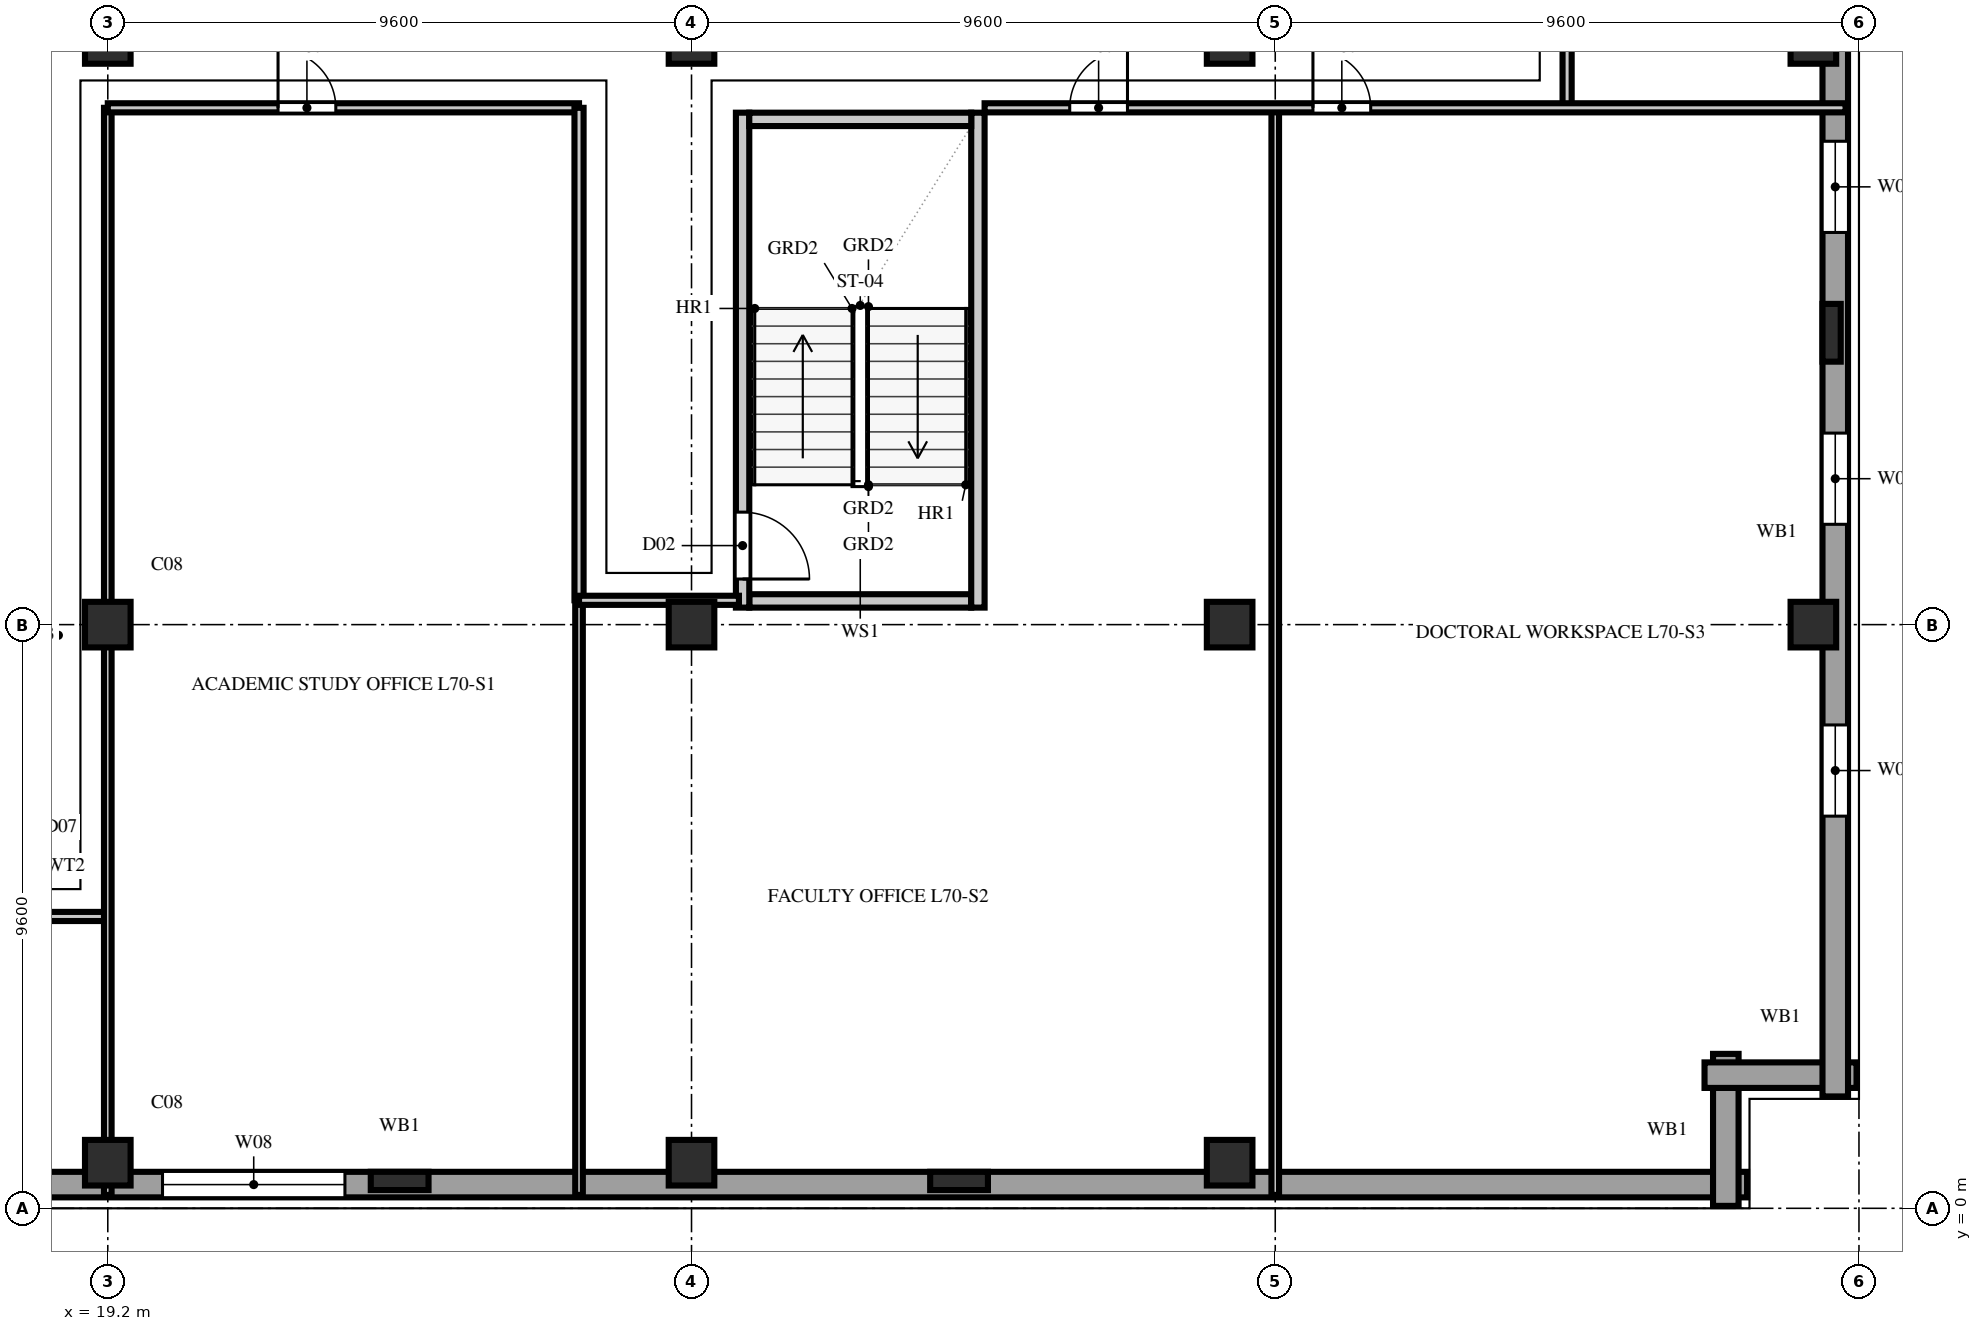
"""IFC4 building model, lengths in metres.
Left out: names, types, materials, properties, quantities, classifications, styles, units other than length and angle.
Written with IfcOpenShell. Run it as: python <this file> out.ifc"""

import sys

from ifc_helpers import new_model, si_unit, direction, frame, frame_2d, origin, origin_2d, place, context, subcontext, project, spatial, rectangle, extrude, element, fill, save


model = new_model("IFC4")
c1 = context("Model", 3, precision=1e-05, world=origin(), true_north=direction((0.0, 1.0)))
c2 = subcontext(c1, "Body", "Model", "MODEL_VIEW")
j1 = project(units=[si_unit("LENGTHUNIT", "METRE"), si_unit("PLANEANGLEUNIT", "RADIAN")], contexts=[c1])
p1 = place(None, origin())
s1 = spatial("IfcSite", under=j1, at=p1, CompositionType="ELEMENT")
p2 = place(p1, origin())
s2 = spatial("IfcBuilding", under=s1, at=p2, CompositionType="ELEMENT")
p3 = place(p2, frame((0.0, 0.0, 277.2)))
s3 = spatial("IfcBuildingStorey", under=s2, at=p3, CompositionType="ELEMENT", Elevation=277.2)
for number, where, z_axis, x_axis in (
    (1, (19.2, 0.75, 0.0), (0.0, 0.0, 1.0), (1.0, 0.0, 0.0)),
    (2, (19.2, 9.6, 0.0), (0.0, 0.0, 1.0), (1.0, 0.0, 0.0)),
    (3, (19.2, 19.2, 0.0), (0.0, 0.0, 1.0), (1.0, 0.0, 0.0)),
    (4, (28.8, 0.75, 0.0), (0.0, 0.0, 1.0), (1.0, 0.0, 0.0)),
    (5, (28.8, 9.6, 0.0), (0.0, 0.0, 1.0), (1.0, 0.0, 0.0)),
    (6, (28.8, 19.2, 0.0), (0.0, 0.0, 1.0), (1.0, 0.0, 0.0)),
    (7, (37.65, 0.75, 0.0), (0.0, 0.0, 1.0), (1.0, 0.0, 0.0)),
    (8, (37.65, 9.6, 0.0), (0.0, 0.0, 1.0), (1.0, 0.0, 0.0)),
    (9, (37.65, 19.2, 0.0), (0.0, 0.0, 1.0), (1.0, 0.0, 0.0)),
    (10, (47.25, 9.6, 0.0), (0.0, 0.0, 1.0), (1.0, 0.0, 0.0)),
    (11, (47.25, 19.2, 0.0), (0.0, 0.0, 1.0), (1.0, 0.0, 0.0)),
):
    element("IfcColumn", number, at=place(p3, frame(where, z_axis=z_axis, x_axis=x_axis)), inside=s3, PredefinedType="COLUMN", context=c2, shape_type="SweptSolid", body=[
        extrude(rectangle(XDim=0.75, YDim=0.75, at=origin_2d()), origin(), (0.0, 0.0, 1.0), 3.8),
    ])
for number, where, z_axis, x_axis in (
    (12, (24.0, 0.45, 0.0), (0.0, 0.0, 1.0), (1.0, 0.0, 0.0)),
    (13, (33.2, 0.45, 0.0), (0.0, 0.0, 1.0), (1.0, 0.0, 0.0)),
    (14, (47.55, 14.4, 0.0), (0.0, 0.0, 1.0), (0.0, 1.0, 0.0)),
):
    element("IfcColumn", number, at=place(p3, frame(where, z_axis=z_axis, x_axis=x_axis)), inside=s3, PredefinedType="PILASTER", context=c2, shape_type="SweptSolid", body=[
        extrude(rectangle(XDim=0.95, YDim=0.3, at=origin_2d()), origin(), (0.0, 0.0, 1.0), 3.8),
    ])
p4 = place(p3, frame((1.84, 0.39, 0.0), z_axis=(0.0, 0.0, 1.0), x_axis=(1.0, 0.0, 0.0)))
e15 = element("IfcWall", 15, at=p4, inside=s3, PredefinedType="SOLIDWALL", context=c2, shape_type="SweptSolid", body=[
    extrude(rectangle(XDim=44.32, YDim=0.42, at=frame_2d((22.16, 0.0))), origin(), (0.0, 0.0, 1.0), 3.54),
])
p5 = place(p4, frame((3.86, 0.0, 0.75)))
e16 = element("IfcOpeningElement", 16, at=p5, cuts=e15, PredefinedType="OPENING", context=c2, shape_type="SweptSolid", body=[
    extrude(rectangle(XDim=3.0, YDim=1.9, at=frame_2d((1.5, 0.95))), frame((0.0, 0.222, 0.0), z_axis=(0.0, -1.0, 0.0), x_axis=(1.0, 0.0, 0.0)), (0.0, 0.0, 1.0), 0.444),
])
p6 = place(p4, frame((8.66, 0.0, 0.75)))
e17 = element("IfcOpeningElement", 17, at=p6, cuts=e15, PredefinedType="OPENING", context=c2, shape_type="SweptSolid", body=[
    extrude(rectangle(XDim=3.0, YDim=1.9, at=frame_2d((1.5, 0.95))), frame((0.0, 0.222, 0.0), z_axis=(0.0, -1.0, 0.0), x_axis=(1.0, 0.0, 0.0)), (0.0, 0.0, 1.0), 0.444),
])
p7 = place(p4, frame((18.26, 0.0, 0.75)))
e18 = element("IfcOpeningElement", 18, at=p7, cuts=e15, PredefinedType="OPENING", context=c2, shape_type="SweptSolid", body=[
    extrude(rectangle(XDim=3.0, YDim=1.9, at=frame_2d((1.5, 0.95))), frame((0.0, 0.222, 0.0), z_axis=(0.0, -1.0, 0.0), x_axis=(1.0, 0.0, 0.0)), (0.0, 0.0, 1.0), 0.444),
])
for number, where, z_axis, x_axis in (
    (19, (45.81, 0.04, 0.0), (0.0, 0.0, 1.0), (0.0, 1.0, 0.0)),
    (20, (45.46, 2.19, 0.0), (0.0, 0.0, 1.0), (1.0, 0.0, 0.0)),
):
    element("IfcWall", number, at=place(p3, frame(where, z_axis=z_axis, x_axis=x_axis)), inside=s3, PredefinedType="SOLIDWALL", context=c2, shape_type="SweptSolid", body=[
        extrude(rectangle(XDim=2.5, YDim=0.42, at=frame_2d((1.25, 0.0))), origin(), (0.0, 0.0, 1.0), 3.54),
    ])
p8 = place(p3, frame((47.61, 1.84, 0.0), z_axis=(0.0, 0.0, 1.0), x_axis=(0.0, 1.0, 0.0)))
e21 = element("IfcWall", 21, at=p8, inside=s3, PredefinedType="SOLIDWALL", context=c2, shape_type="SweptSolid", body=[
    extrude(rectangle(XDim=18.56, YDim=0.42, at=frame_2d((9.28, 0.0))), origin(), (0.0, 0.0, 1.0), 3.54),
])
p9 = place(p8, frame((4.61, 0.0, 0.85)))
e22 = element("IfcOpeningElement", 22, at=p9, cuts=e21, PredefinedType="OPENING", context=c2, shape_type="SweptSolid", body=[
    extrude(rectangle(XDim=1.5, YDim=1.85, at=frame_2d((0.75, 0.925))), frame((0.0, 0.222, 0.0), z_axis=(0.0, -1.0, 0.0), x_axis=(1.0, 0.0, 0.0)), (0.0, 0.0, 1.0), 0.444),
])
p10 = place(p8, frame((9.41, 0.0, 0.85)))
e23 = element("IfcOpeningElement", 23, at=p10, cuts=e21, PredefinedType="OPENING", context=c2, shape_type="SweptSolid", body=[
    extrude(rectangle(XDim=1.5, YDim=1.85, at=frame_2d((0.75, 0.925))), frame((0.0, 0.222, 0.0), z_axis=(0.0, -1.0, 0.0), x_axis=(1.0, 0.0, 0.0)), (0.0, 0.0, 1.0), 0.444),
])
p11 = place(p8, frame((14.21, 0.0, 0.85)))
e24 = element("IfcOpeningElement", 24, at=p11, cuts=e21, PredefinedType="OPENING", context=c2, shape_type="SweptSolid", body=[
    extrude(rectangle(XDim=1.5, YDim=1.85, at=frame_2d((0.75, 0.925))), frame((0.0, 0.222, 0.0), z_axis=(0.0, -1.0, 0.0), x_axis=(1.0, 0.0, 0.0)), (0.0, 0.0, 1.0), 0.444),
])
p12 = place(p3, frame((29.75, 9.99, 0.0), z_axis=(0.0, 0.0, 1.0), x_axis=(1.0, 0.0, 0.0)))
e25 = element("IfcWall", 25, at=p12, inside=s3, PredefinedType="SOLIDWALL", context=c2, shape_type="SweptSolid", body=[
    extrude(rectangle(XDim=3.65, YDim=0.22, at=frame_2d((1.825, 0.0))), origin(), (0.0, 0.0, 1.0), 3.54),
])
p13 = place(p3, frame((29.64, 9.88, 0.0), z_axis=(0.0, 0.0, 1.0), x_axis=(0.0, 1.0, 0.0)))
e26 = element("IfcWall", 26, at=p13, inside=s3, PredefinedType="SOLIDWALL", context=c2, shape_type="SweptSolid", body=[
    extrude(rectangle(XDim=8.14, YDim=0.22, at=frame_2d((4.07, 0.0))), origin(), (0.0, 0.0, 1.0), 3.54),
])
p14 = place(p13, frame((0.47, 0.0, 0.0)))
e27 = element("IfcOpeningElement", 27, at=p14, cuts=e26, PredefinedType="OPENING", context=c2, shape_type="SweptSolid", body=[
    extrude(rectangle(XDim=1.1, YDim=2.2, at=frame_2d((0.55, 1.1))), frame((0.0, 0.122, 0.0), z_axis=(0.0, -1.0, 0.0), x_axis=(1.0, 0.0, 0.0)), (0.0, 0.0, 1.0), 0.244),
])
p15 = place(p3, frame((33.51, 9.88, 0.0), z_axis=(0.0, 0.0, 1.0), x_axis=(0.0, 1.0, 0.0)))
e28 = element("IfcWall", 28, at=p15, inside=s3, PredefinedType="SOLIDWALL", context=c2, shape_type="SweptSolid", body=[
    extrude(rectangle(XDim=8.14, YDim=0.22, at=frame_2d((4.07, 0.0))), origin(), (0.0, 0.0, 1.0), 3.54),
])
p16 = place(p3, frame((29.75, 17.91, 0.0), z_axis=(0.0, 0.0, 1.0), x_axis=(1.0, 0.0, 0.0)))
e29 = element("IfcWall", 29, at=p16, inside=s3, PredefinedType="SOLIDWALL", context=c2, shape_type="SweptSolid", body=[
    extrude(rectangle(XDim=3.65, YDim=0.22, at=frame_2d((1.825, 0.0))), origin(), (0.0, 0.0, 1.0), 3.54),
])
p17 = place(p3, frame((17.05, 4.8, 0.0), z_axis=(0.0, 0.0, 1.0), x_axis=(1.0, 0.0, 0.0)))
e30 = element("IfcWall", 30, at=p17, inside=s3, PredefinedType="PARTITIONING", context=c2, shape_type="SweptSolid", body=[
    extrude(rectangle(XDim=2.15, YDim=0.15, at=frame_2d((1.075, 0.0))), origin(), (0.0, 0.0, 1.0), 3.54),
])
p18 = place(p3, frame((43.2, 18.1, 0.0), z_axis=(0.0, 0.0, 1.0), x_axis=(0.0, 1.0, 0.0)))
e31 = element("IfcWall", 31, at=p18, inside=s3, PredefinedType="PARTITIONING", context=c2, shape_type="SweptSolid", body=[
    extrude(rectangle(XDim=2.85, YDim=0.15, at=frame_2d((1.425, 0.0))), origin(), (0.0, 0.0, 1.0), 3.54),
])
p19 = place(p3, frame((19.2, 0.22, 0.0), z_axis=(0.0, 0.0, 1.0), x_axis=(0.0, 1.0, 0.0)))
e32 = element("IfcWall", 32, at=p19, inside=s3, PredefinedType="PARTITIONING", context=c2, shape_type="SweptSolid", body=[
    extrude(rectangle(XDim=0.53, YDim=0.125, at=frame_2d((0.265, 0.0))), origin(), (0.0, 0.0, 1.0), 3.54),
])
p20 = place(p3, frame((19.2, 0.75, 0.0), z_axis=(0.0, 0.0, 1.0), x_axis=(0.0, 1.0, 0.0)))
e33 = element("IfcWall", 33, at=p20, inside=s3, PredefinedType="PARTITIONING", context=c2, shape_type="SweptSolid", body=[
    extrude(rectangle(XDim=17.35, YDim=0.125, at=frame_2d((8.675, 0.0))), origin(), (0.0, 0.0, 1.0), 2.845),
])
p21 = place(p3, frame((19.2, 18.1, 0.0), z_axis=(0.0, 0.0, 1.0), x_axis=(1.0, 0.0, 0.0)))
e34 = element("IfcWall", 34, at=p21, inside=s3, PredefinedType="PARTITIONING", context=c2, shape_type="SweptSolid", body=[
    extrude(rectangle(XDim=7.75, YDim=0.15, at=frame_2d((3.875, 0.0))), origin(), (0.0, 0.0, 1.0), 3.54),
])
p22 = place(p21, frame((2.8, 0.0, 0.0)))
e35 = element("IfcOpeningElement", 35, at=p22, cuts=e34, PredefinedType="OPENING", context=c2, shape_type="SweptSolid", body=[
    extrude(rectangle(XDim=0.95, YDim=2.15, at=frame_2d((0.475, 1.075))), frame((0.0, 0.087, 0.0), z_axis=(0.0, -1.0, 0.0), x_axis=(1.0, 0.0, 0.0)), (0.0, 0.0, 1.0), 0.174),
])
p23 = place(p3, frame((26.95, 0.22, 0.0), z_axis=(0.0, 0.0, 1.0), x_axis=(0.0, 1.0, 0.0)))
e36 = element("IfcWall", 36, at=p23, inside=s3, PredefinedType="PARTITIONING", context=c2, shape_type="SweptSolid", body=[
    extrude(rectangle(XDim=9.78, YDim=0.125, at=frame_2d((4.89, 0.0))), origin(), (0.0, 0.0, 1.0), 3.54),
])
p24 = place(p3, frame((26.95, 10.0, 0.0), z_axis=(0.0, 0.0, 1.0), x_axis=(0.0, 1.0, 0.0)))
e37 = element("IfcWall", 37, at=p24, inside=s3, PredefinedType="PARTITIONING", context=c2, shape_type="SweptSolid", body=[
    extrude(rectangle(XDim=8.1, YDim=0.15, at=frame_2d((4.05, 0.0))), origin(), (0.0, 0.0, 1.0), 3.54),
])
p25 = place(p3, frame((26.95, 10.0, 0.0), z_axis=(0.0, 0.0, 1.0), x_axis=(1.0, 0.0, 0.0)))
e38 = element("IfcWall", 38, at=p25, inside=s3, PredefinedType="PARTITIONING", context=c2, shape_type="SweptSolid", body=[
    extrude(rectangle(XDim=2.63, YDim=0.15, at=frame_2d((1.315, 0.0))), origin(), (0.0, 0.0, 1.0), 3.54),
])
p26 = place(p3, frame((38.4, 0.22, 0.0), z_axis=(0.0, 0.0, 1.0), x_axis=(0.0, 1.0, 0.0)))
e39 = element("IfcWall", 39, at=p26, inside=s3, PredefinedType="PARTITIONING", context=c2, shape_type="SweptSolid", body=[
    extrude(rectangle(XDim=17.88, YDim=0.125, at=frame_2d((8.94, 0.0))), origin(), (0.0, 0.0, 1.0), 3.54),
])
p27 = place(p3, frame((33.62, 18.1, 0.0), z_axis=(0.0, 0.0, 1.0), x_axis=(1.0, 0.0, 0.0)))
e40 = element("IfcWall", 40, at=p27, inside=s3, PredefinedType="PARTITIONING", context=c2, shape_type="SweptSolid", body=[
    extrude(rectangle(XDim=14.16, YDim=0.15, at=frame_2d((7.08, 0.0))), origin(), (0.0, 0.0, 1.0), 3.54),
])
p28 = place(p27, frame((1.4, 0.0, 0.0)))
e41 = element("IfcOpeningElement", 41, at=p28, cuts=e40, PredefinedType="OPENING", context=c2, shape_type="SweptSolid", body=[
    extrude(rectangle(XDim=0.95, YDim=2.15, at=frame_2d((0.475, 1.075))), frame((0.0, 0.087, 0.0), z_axis=(0.0, -1.0, 0.0), x_axis=(1.0, 0.0, 0.0)), (0.0, 0.0, 1.0), 0.174),
])
p29 = place(p27, frame((5.4, 0.0, 0.0)))
e42 = element("IfcOpeningElement", 42, at=p29, cuts=e40, PredefinedType="OPENING", context=c2, shape_type="SweptSolid", body=[
    extrude(rectangle(XDim=0.95, YDim=2.15, at=frame_2d((0.475, 1.075))), frame((0.0, 0.087, 0.0), z_axis=(0.0, -1.0, 0.0), x_axis=(1.0, 0.0, 0.0)), (0.0, 0.0, 1.0), 0.174),
])
p30 = place(p7, origin())
e43 = element("IfcWindow", 43, at=p30, inside=s3, PartitioningType="TRIPLE_PANEL_VERTICAL", PredefinedType="WINDOW", context=c2, shape_type="SweptSolid", body=[
    extrude(rectangle(XDim=3.0, YDim=1.9, at=frame_2d((1.5, 0.95))), frame((0.0, 0.11, 0.0), z_axis=(0.0, -1.0, 0.0), x_axis=(1.0, 0.0, 0.0)), (0.0, 0.0, 1.0), 0.06),
])
fill(e18, e43)
p31 = place(p9, origin())
e44 = element("IfcWindow", 44, at=p31, inside=s3, PartitioningType="DOUBLE_PANEL_VERTICAL", PredefinedType="WINDOW", context=c2, shape_type="SweptSolid", body=[
    extrude(rectangle(XDim=1.5, YDim=1.85, at=frame_2d((0.75, 0.925))), frame((0.0, 0.11, 0.0), z_axis=(0.0, -1.0, 0.0), x_axis=(1.0, 0.0, 0.0)), (0.0, 0.0, 1.0), 0.06),
])
fill(e22, e44)
p32 = place(p10, origin())
e45 = element("IfcWindow", 45, at=p32, inside=s3, PartitioningType="DOUBLE_PANEL_VERTICAL", PredefinedType="WINDOW", context=c2, shape_type="SweptSolid", body=[
    extrude(rectangle(XDim=1.5, YDim=1.85, at=frame_2d((0.75, 0.925))), frame((0.0, 0.11, 0.0), z_axis=(0.0, -1.0, 0.0), x_axis=(1.0, 0.0, 0.0)), (0.0, 0.0, 1.0), 0.06),
])
fill(e23, e45)
p33 = place(p11, origin())
e46 = element("IfcWindow", 46, at=p33, inside=s3, PartitioningType="DOUBLE_PANEL_VERTICAL", PredefinedType="WINDOW", context=c2, shape_type="SweptSolid", body=[
    extrude(rectangle(XDim=1.5, YDim=1.85, at=frame_2d((0.75, 0.925))), frame((0.0, 0.11, 0.0), z_axis=(0.0, -1.0, 0.0), x_axis=(1.0, 0.0, 0.0)), (0.0, 0.0, 1.0), 0.06),
])
fill(e24, e46)
p34 = place(p14, frame((1.1, 0.0, 0.0), z_axis=(0.0, 0.0, 1.0), x_axis=(-1.0, 0.0, 0.0)))
e47 = element("IfcDoor", 47, at=p34, inside=s3, OperationType="SINGLE_SWING_RIGHT", PredefinedType="DOOR", context=c2, shape_type="SweptSolid", body=[
    extrude(rectangle(XDim=1.1, YDim=2.2, at=frame_2d((0.55, 1.1))), frame((0.0, 0.025, 0.0), z_axis=(0.0, -1.0, 0.0), x_axis=(1.0, 0.0, 0.0)), (0.0, 0.0, 1.0), 0.05),
])
fill(e27, e47)
p35 = place(p22, origin())
e48 = element("IfcDoor", 48, at=p35, inside=s3, OperationType="SINGLE_SWING_LEFT", PredefinedType="DOOR", context=c2, shape_type="SweptSolid", body=[
    extrude(rectangle(XDim=0.95, YDim=2.15, at=frame_2d((0.475, 1.075))), frame((0.0, 0.025, 0.0), z_axis=(0.0, -1.0, 0.0), x_axis=(1.0, 0.0, 0.0)), (0.0, 0.0, 1.0), 0.05),
])
fill(e35, e48)
p36 = place(p28, origin())
e49 = element("IfcDoor", 49, at=p36, inside=s3, OperationType="SINGLE_SWING_RIGHT", PredefinedType="DOOR", context=c2, shape_type="SweptSolid", body=[
    extrude(rectangle(XDim=0.95, YDim=2.15, at=frame_2d((0.475, 1.075))), frame((0.0, 0.025, 0.0), z_axis=(0.0, -1.0, 0.0), x_axis=(1.0, 0.0, 0.0)), (0.0, 0.0, 1.0), 0.05),
])
fill(e41, e49)
p37 = place(p29, origin())
e50 = element("IfcDoor", 50, at=p37, inside=s3, OperationType="SINGLE_SWING_LEFT", PredefinedType="DOOR", context=c2, shape_type="SweptSolid", body=[
    extrude(rectangle(XDim=0.95, YDim=2.15, at=frame_2d((0.475, 1.075))), frame((0.0, 0.025, 0.0), z_axis=(0.0, -1.0, 0.0), x_axis=(1.0, 0.0, 0.0)), (0.0, 0.0, 1.0), 0.05),
])
fill(e42, e50)
save(model, sys.argv[1])
